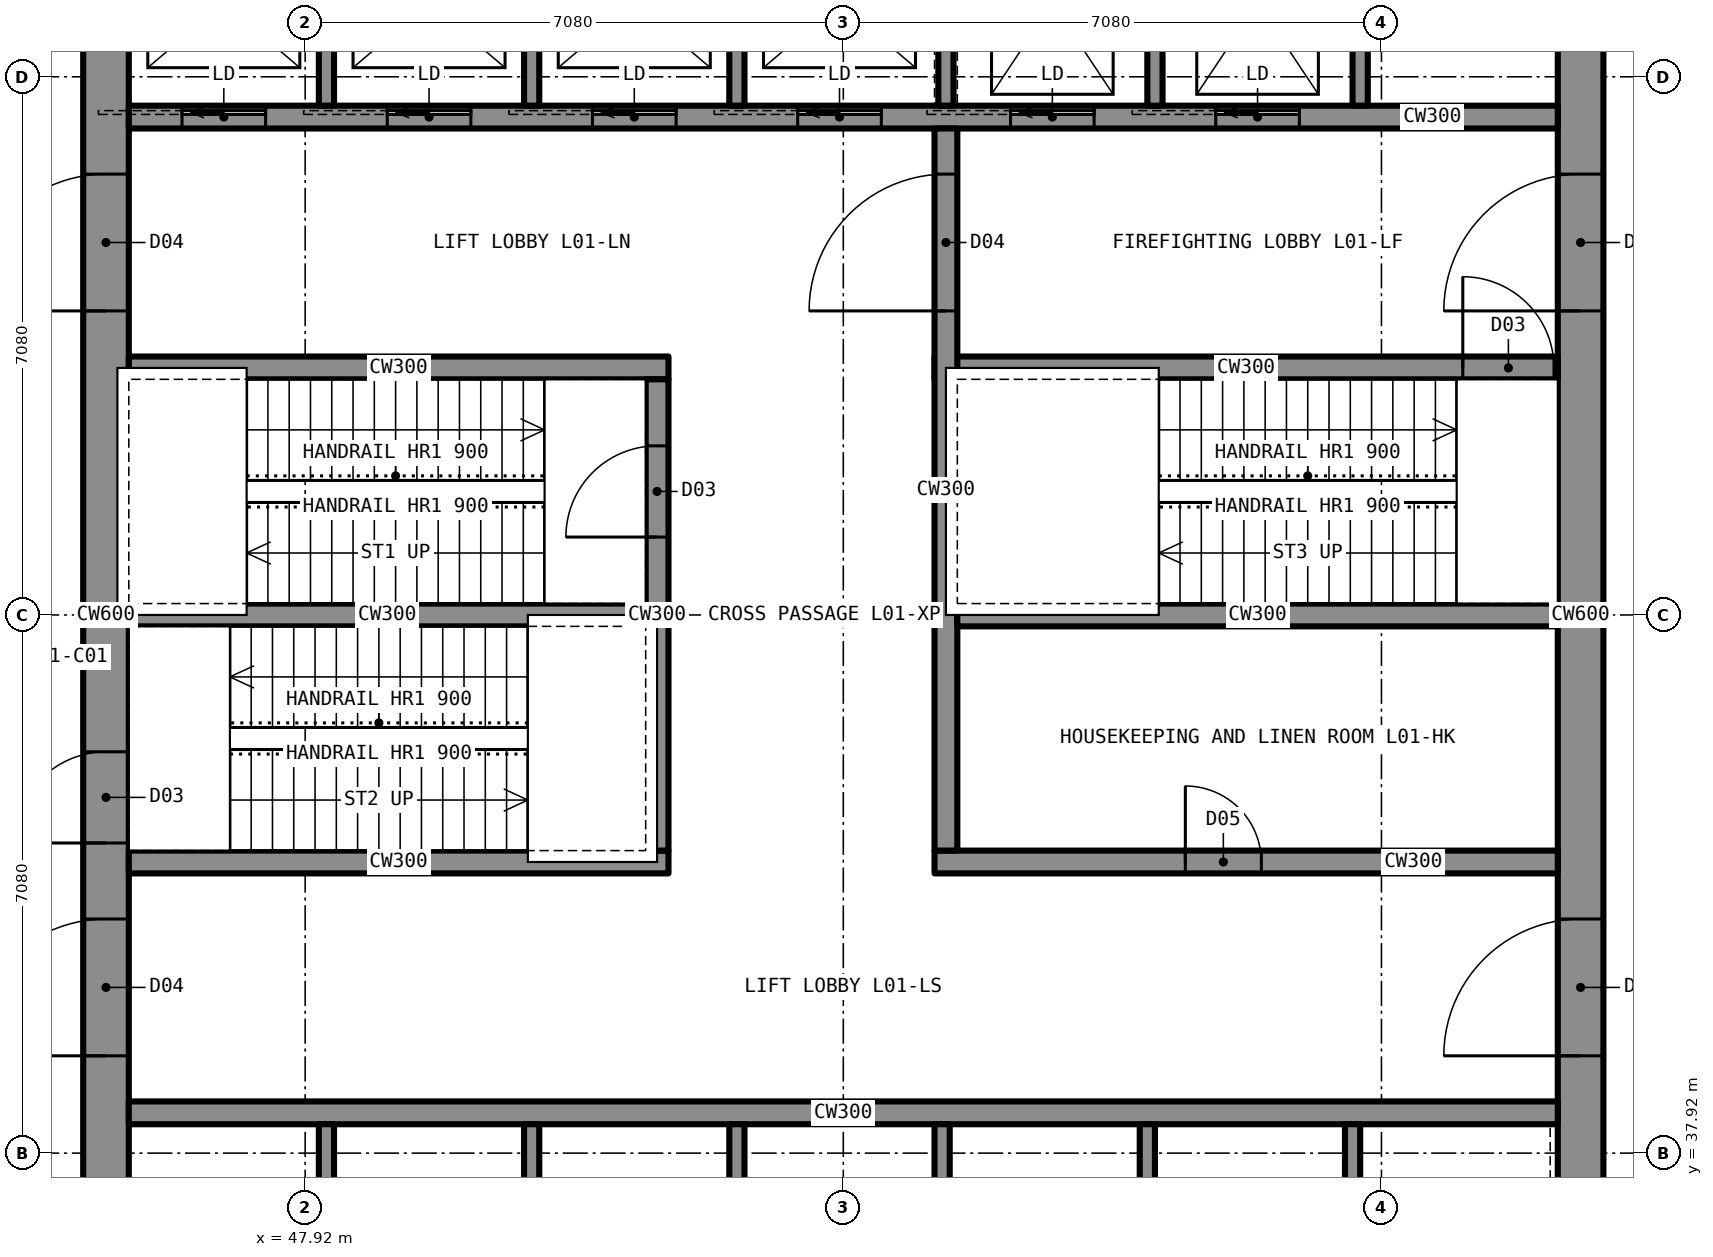
"""IFC4 building model, lengths in metres.
Left out: names, types, materials, properties, quantities, classifications, styles, units other than length and angle.
Written with IfcOpenShell. Run it as: python <this file> out.ifc"""

import sys

from ifc_helpers import new_model, si_unit, direction, frame, frame_2d, origin, place, context, subcontext, project, spatial, rectangle, extrude, element, fill, save


model = new_model("IFC4")
c1 = context("Model", 3, precision=1e-05, world=origin(), true_north=direction((0.0, 1.0)))
c2 = subcontext(c1, "Body", "Model", "MODEL_VIEW")
j1 = project(units=[si_unit("LENGTHUNIT", "METRE"), si_unit("PLANEANGLEUNIT", "RADIAN")], contexts=[c1])
p1 = place(None, origin())
s1 = spatial("IfcSite", under=j1, at=p1, CompositionType="ELEMENT")
p2 = place(p1, origin())
s2 = spatial("IfcBuilding", under=s1, at=p2, CompositionType="ELEMENT")
p3 = place(p2, frame((0.0, 0.0, 5.6)))
s3 = spatial("IfcBuildingStorey", under=s2, at=p3, CompositionType="ELEMENT", Elevation=5.6)
p4 = place(p3, frame((64.7, 35.6, 0.0), z_axis=(0.0, 0.0, 1.0), x_axis=(0.0, 1.0, 0.0)))
e1 = element("IfcWall", 1, at=p4, inside=s3, PredefinedType="SHEAR", context=c2, shape_type="SweptSolid", body=[
    extrude(rectangle(XDim=18.8, YDim=0.6, at=frame_2d((9.4, 0.0))), origin(), (0.0, 0.0, 1.0), 5.4),
])
p5 = place(p4, frame((13.4, 0.0, 0.0)))
e2 = element("IfcOpeningElement", 2, at=p5, cuts=e1, PredefinedType="OPENING", context=c2, shape_type="SweptSolid", body=[
    extrude(rectangle(XDim=1.8, YDim=2.2, at=frame_2d((0.9, 1.1))), frame((0.0, 0.31, 0.0), z_axis=(0.0, -1.0, 0.0), x_axis=(1.0, 0.0, 0.0)), (0.0, 0.0, 1.0), 0.62),
])
p6 = place(p4, frame((3.6, 0.0, 0.0)))
e3 = element("IfcOpeningElement", 3, at=p6, cuts=e1, PredefinedType="OPENING", context=c2, shape_type="SweptSolid", body=[
    extrude(rectangle(XDim=1.8, YDim=2.2, at=frame_2d((0.9, 1.1))), frame((0.0, 0.31, 0.0), z_axis=(0.0, -1.0, 0.0), x_axis=(1.0, 0.0, 0.0)), (0.0, 0.0, 1.0), 0.62),
])
p7 = place(p3, frame((45.3, 35.6, 0.0), z_axis=(0.0, 0.0, 1.0), x_axis=(0.0, 1.0, 0.0)))
e4 = element("IfcWall", 4, at=p7, inside=s3, PredefinedType="SHEAR", context=c2, shape_type="SweptSolid", body=[
    extrude(rectangle(XDim=18.8, YDim=0.6, at=frame_2d((9.4, 0.0))), origin(), (0.0, 0.0, 1.0), 5.4),
])
p8 = place(p7, frame((13.4, 0.0, 0.0)))
e5 = element("IfcOpeningElement", 5, at=p8, cuts=e4, PredefinedType="OPENING", context=c2, shape_type="SweptSolid", body=[
    extrude(rectangle(XDim=1.8, YDim=2.2, at=frame_2d((0.9, 1.1))), frame((0.0, 0.31, 0.0), z_axis=(0.0, -1.0, 0.0), x_axis=(1.0, 0.0, 0.0)), (0.0, 0.0, 1.0), 0.62),
])
p9 = place(p7, frame((3.6, 0.0, 0.0)))
e6 = element("IfcOpeningElement", 6, at=p9, cuts=e4, PredefinedType="OPENING", context=c2, shape_type="SweptSolid", body=[
    extrude(rectangle(XDim=1.8, YDim=2.2, at=frame_2d((0.9, 1.1))), frame((0.0, 0.31, 0.0), z_axis=(0.0, -1.0, 0.0), x_axis=(1.0, 0.0, 0.0)), (0.0, 0.0, 1.0), 0.62),
])
p10 = place(p7, frame((6.4, 0.0, 0.0)))
e7 = element("IfcOpeningElement", 7, at=p10, cuts=e4, PredefinedType="OPENING", context=c2, shape_type="SweptSolid", body=[
    extrude(rectangle(XDim=1.2, YDim=2.2, at=frame_2d((0.6, 1.1))), frame((0.0, 0.31, 0.0), z_axis=(0.0, -1.0, 0.0), x_axis=(1.0, 0.0, 0.0)), (0.0, 0.0, 1.0), 0.62),
])
p11 = place(p3, frame((45.6, 51.55, 0.0), z_axis=(0.0, 0.0, 1.0), x_axis=(1.0, 0.0, 0.0)))
e8 = element("IfcWall", 8, at=p11, inside=s3, PredefinedType="SHEAR", context=c2, shape_type="SweptSolid", body=[
    extrude(rectangle(XDim=18.8, YDim=0.3, at=frame_2d((9.4, 0.0))), origin(), (0.0, 0.0, 1.0), 5.4),
])
p12 = place(p11, frame((0.7, 0.0, 0.0)))
e9 = element("IfcOpeningElement", 9, at=p12, cuts=e8, PredefinedType="OPENING", context=c2, shape_type="SweptSolid", body=[
    extrude(rectangle(XDim=1.1, YDim=2.2, at=frame_2d((0.55, 1.1))), frame((0.0, 0.16, 0.0), z_axis=(0.0, -1.0, 0.0), x_axis=(1.0, 0.0, 0.0)), (0.0, 0.0, 1.0), 0.32),
])
p13 = place(p11, frame((3.4, 0.0, 0.0)))
e10 = element("IfcOpeningElement", 10, at=p13, cuts=e8, PredefinedType="OPENING", context=c2, shape_type="SweptSolid", body=[
    extrude(rectangle(XDim=1.1, YDim=2.2, at=frame_2d((0.55, 1.1))), frame((0.0, 0.16, 0.0), z_axis=(0.0, -1.0, 0.0), x_axis=(1.0, 0.0, 0.0)), (0.0, 0.0, 1.0), 0.32),
])
p14 = place(p11, frame((6.1, 0.0, 0.0)))
e11 = element("IfcOpeningElement", 11, at=p14, cuts=e8, PredefinedType="OPENING", context=c2, shape_type="SweptSolid", body=[
    extrude(rectangle(XDim=1.1, YDim=2.2, at=frame_2d((0.55, 1.1))), frame((0.0, 0.16, 0.0), z_axis=(0.0, -1.0, 0.0), x_axis=(1.0, 0.0, 0.0)), (0.0, 0.0, 1.0), 0.32),
])
p15 = place(p11, frame((8.8, 0.0, 0.0)))
e12 = element("IfcOpeningElement", 12, at=p15, cuts=e8, PredefinedType="OPENING", context=c2, shape_type="SweptSolid", body=[
    extrude(rectangle(XDim=1.1, YDim=2.2, at=frame_2d((0.55, 1.1))), frame((0.0, 0.16, 0.0), z_axis=(0.0, -1.0, 0.0), x_axis=(1.0, 0.0, 0.0)), (0.0, 0.0, 1.0), 0.32),
])
p16 = place(p11, frame((11.6, 0.0, 0.0)))
e13 = element("IfcOpeningElement", 13, at=p16, cuts=e8, PredefinedType="OPENING", context=c2, shape_type="SweptSolid", body=[
    extrude(rectangle(XDim=1.1, YDim=2.2, at=frame_2d((0.55, 1.1))), frame((0.0, 0.16, 0.0), z_axis=(0.0, -1.0, 0.0), x_axis=(1.0, 0.0, 0.0)), (0.0, 0.0, 1.0), 0.32),
])
p17 = place(p11, frame((14.3, 0.0, 0.0)))
e14 = element("IfcOpeningElement", 14, at=p17, cuts=e8, PredefinedType="OPENING", context=c2, shape_type="SweptSolid", body=[
    extrude(rectangle(XDim=1.1, YDim=2.2, at=frame_2d((0.55, 1.1))), frame((0.0, 0.16, 0.0), z_axis=(0.0, -1.0, 0.0), x_axis=(1.0, 0.0, 0.0)), (0.0, 0.0, 1.0), 0.32),
])
p18 = place(p3, frame((45.6, 38.45, 0.0), z_axis=(0.0, 0.0, 1.0), x_axis=(1.0, 0.0, 0.0)))
e15 = element("IfcWall", 15, at=p18, inside=s3, PredefinedType="SHEAR", context=c2, shape_type="SweptSolid", body=[
    extrude(rectangle(XDim=18.8, YDim=0.3, at=frame_2d((9.4, 0.0))), origin(), (0.0, 0.0, 1.0), 5.4),
])
p19 = place(p3, frame((45.6, 48.25, 0.0), z_axis=(0.0, 0.0, 1.0), x_axis=(1.0, 0.0, 0.0)))
e16 = element("IfcWall", 16, at=p19, inside=s3, PredefinedType="SHEAR", context=c2, shape_type="SweptSolid", body=[
    extrude(rectangle(XDim=7.1, YDim=0.3, at=frame_2d((3.55, 0.0))), origin(), (0.0, 0.0, 1.0), 5.4),
])
p20 = place(p3, frame((56.2, 48.25, 0.0), z_axis=(0.0, 0.0, 1.0), x_axis=(1.0, 0.0, 0.0)))
e17 = element("IfcWall", 17, at=p20, inside=s3, PredefinedType="SHEAR", context=c2, shape_type="SweptSolid", body=[
    extrude(rectangle(XDim=8.2, YDim=0.3, at=frame_2d((4.1, 0.0))), origin(), (0.0, 0.0, 1.0), 5.4),
])
p21 = place(p20, frame((6.95, 0.0, 0.0)))
e18 = element("IfcOpeningElement", 18, at=p21, cuts=e17, PredefinedType="OPENING", context=c2, shape_type="SweptSolid", body=[
    extrude(rectangle(XDim=1.2, YDim=2.2, at=frame_2d((0.6, 1.1))), frame((0.0, 0.16, 0.0), z_axis=(0.0, -1.0, 0.0), x_axis=(1.0, 0.0, 0.0)), (0.0, 0.0, 1.0), 0.32),
])
p22 = place(p3, frame((45.6, 41.75, 0.0), z_axis=(0.0, 0.0, 1.0), x_axis=(1.0, 0.0, 0.0)))
e19 = element("IfcWall", 19, at=p22, inside=s3, PredefinedType="SHEAR", context=c2, shape_type="SweptSolid", body=[
    extrude(rectangle(XDim=7.1, YDim=0.3, at=frame_2d((3.55, 0.0))), origin(), (0.0, 0.0, 1.0), 5.4),
])
p23 = place(p3, frame((56.2, 41.75, 0.0), z_axis=(0.0, 0.0, 1.0), x_axis=(1.0, 0.0, 0.0)))
e20 = element("IfcWall", 20, at=p23, inside=s3, PredefinedType="SHEAR", context=c2, shape_type="SweptSolid", body=[
    extrude(rectangle(XDim=8.2, YDim=0.3, at=frame_2d((4.1, 0.0))), origin(), (0.0, 0.0, 1.0), 5.4),
])
p24 = place(p23, frame((3.3, 0.0, 0.0)))
e21 = element("IfcOpeningElement", 21, at=p24, cuts=e20, PredefinedType="OPENING", context=c2, shape_type="SweptSolid", body=[
    extrude(rectangle(XDim=1.0, YDim=2.1, at=frame_2d((0.5, 1.05))), frame((0.0, 0.16, 0.0), z_axis=(0.0, -1.0, 0.0), x_axis=(1.0, 0.0, 0.0)), (0.0, 0.0, 1.0), 0.32),
])
p25 = place(p3, frame((52.55, 41.9, 0.0), z_axis=(0.0, 0.0, 1.0), x_axis=(0.0, 1.0, 0.0)))
e22 = element("IfcWall", 22, at=p25, inside=s3, PredefinedType="SHEAR", context=c2, shape_type="SweptSolid", body=[
    extrude(rectangle(XDim=6.2, YDim=0.3, at=frame_2d((3.1, 0.0))), origin(), (0.0, 0.0, 1.0), 5.4),
])
p26 = place(p25, frame((4.125, 0.0, 0.0)))
e23 = element("IfcOpeningElement", 23, at=p26, cuts=e22, PredefinedType="OPENING", context=c2, shape_type="SweptSolid", body=[
    extrude(rectangle(XDim=1.2, YDim=2.2, at=frame_2d((0.6, 1.1))), frame((0.0, 0.16, 0.0), z_axis=(0.0, -1.0, 0.0), x_axis=(1.0, 0.0, 0.0)), (0.0, 0.0, 1.0), 0.32),
])
p27 = place(p3, frame((56.35, 41.9, 0.0), z_axis=(0.0, 0.0, 1.0), x_axis=(0.0, 1.0, 0.0)))
e24 = element("IfcWall", 24, at=p27, inside=s3, PredefinedType="SHEAR", context=c2, shape_type="SweptSolid", body=[
    extrude(rectangle(XDim=9.5, YDim=0.3, at=frame_2d((4.75, 0.0))), origin(), (0.0, 0.0, 1.0), 5.4),
])
p28 = place(p27, frame((7.1, 0.0, 0.0)))
e25 = element("IfcOpeningElement", 25, at=p28, cuts=e24, PredefinedType="OPENING", context=c2, shape_type="SweptSolid", body=[
    extrude(rectangle(XDim=1.8, YDim=2.2, at=frame_2d((0.9, 1.1))), frame((0.0, 0.16, 0.0), z_axis=(0.0, -1.0, 0.0), x_axis=(1.0, 0.0, 0.0)), (0.0, 0.0, 1.0), 0.32),
])
p29 = place(p3, frame((45.6, 45.0, 0.0), z_axis=(0.0, 0.0, 1.0), x_axis=(1.0, 0.0, 0.0)))
e26 = element("IfcWall", 26, at=p29, inside=s3, PredefinedType="SHEAR", context=c2, shape_type="SweptSolid", body=[
    extrude(rectangle(XDim=6.8, YDim=0.3, at=frame_2d((3.4, 0.0))), origin(), (0.0, 0.0, 1.0), 5.4),
])
p30 = place(p3, frame((56.5, 45.0, 0.0), z_axis=(0.0, 0.0, 1.0), x_axis=(1.0, 0.0, 0.0)))
e27 = element("IfcWall", 27, at=p30, inside=s3, PredefinedType="SHEAR", context=c2, shape_type="SweptSolid", body=[
    extrude(rectangle(XDim=7.9, YDim=0.3, at=frame_2d((3.95, 0.0))), origin(), (0.0, 0.0, 1.0), 5.4),
])
for number, where, z_axis, x_axis in (
    (28, (48.2, 51.7, 0.0), (0.0, 0.0, 1.0), (0.0, 1.0, 0.0)),
    (29, (50.9, 51.7, 0.0), (0.0, 0.0, 1.0), (0.0, 1.0, 0.0)),
    (30, (53.6, 51.7, 0.0), (0.0, 0.0, 1.0), (0.0, 1.0, 0.0)),
    (31, (59.1, 51.7, 0.0), (0.0, 0.0, 1.0), (0.0, 1.0, 0.0)),
    (32, (61.8, 51.7, 0.0), (0.0, 0.0, 1.0), (0.0, 1.0, 0.0)),
    (33, (56.35, 51.7, 0.0), (0.0, 0.0, 1.0), (0.0, 1.0, 0.0)),
    (34, (48.2, 35.6, 0.0), (0.0, 0.0, 1.0), (0.0, 1.0, 0.0)),
    (35, (50.9, 35.6, 0.0), (0.0, 0.0, 1.0), (0.0, 1.0, 0.0)),
    (36, (53.6, 35.6, 0.0), (0.0, 0.0, 1.0), (0.0, 1.0, 0.0)),
    (37, (56.3, 35.6, 0.0), (0.0, 0.0, 1.0), (0.0, 1.0, 0.0)),
    (38, (59.0, 35.6, 0.0), (0.0, 0.0, 1.0), (0.0, 1.0, 0.0)),
    (39, (61.7, 35.6, 0.0), (0.0, 0.0, 1.0), (0.0, 1.0, 0.0)),
):
    element("IfcWall", number, at=place(p3, frame(where, z_axis=z_axis, x_axis=x_axis)), inside=s3, PredefinedType="PARTITIONING", context=c2, shape_type="SweptSolid", body=[
        extrude(rectangle(XDim=2.7, YDim=0.2, at=frame_2d((1.35, 0.0))), origin(), (0.0, 0.0, 1.0), 5.05),
    ])
p31 = place(p8, origin())
e40 = element("IfcDoor", 40, at=p31, inside=s3, OperationType="DOUBLE_DOOR_SINGLE_SWING", PredefinedType="DOOR", context=c2, shape_type="SweptSolid", body=[
    extrude(rectangle(XDim=1.8, YDim=2.2, at=frame_2d((0.9, 1.1))), frame((0.0, 0.025, 0.0), z_axis=(0.0, -1.0, 0.0), x_axis=(1.0, 0.0, 0.0)), (0.0, 0.0, 1.0), 0.05),
])
fill(e5, e40)
p32 = place(p9, origin())
e41 = element("IfcDoor", 41, at=p32, inside=s3, OperationType="DOUBLE_DOOR_SINGLE_SWING", PredefinedType="DOOR", context=c2, shape_type="SweptSolid", body=[
    extrude(rectangle(XDim=1.8, YDim=2.2, at=frame_2d((0.9, 1.1))), frame((0.0, 0.025, 0.0), z_axis=(0.0, -1.0, 0.0), x_axis=(1.0, 0.0, 0.0)), (0.0, 0.0, 1.0), 0.05),
])
fill(e6, e41)
p33 = place(p5, origin())
e42 = element("IfcDoor", 42, at=p33, inside=s3, OperationType="DOUBLE_DOOR_SINGLE_SWING", PredefinedType="DOOR", context=c2, shape_type="SweptSolid", body=[
    extrude(rectangle(XDim=1.8, YDim=2.2, at=frame_2d((0.9, 1.1))), frame((0.0, 0.025, 0.0), z_axis=(0.0, -1.0, 0.0), x_axis=(1.0, 0.0, 0.0)), (0.0, 0.0, 1.0), 0.05),
])
fill(e2, e42)
p34 = place(p6, origin())
e43 = element("IfcDoor", 43, at=p34, inside=s3, OperationType="DOUBLE_DOOR_SINGLE_SWING", PredefinedType="DOOR", context=c2, shape_type="SweptSolid", body=[
    extrude(rectangle(XDim=1.8, YDim=2.2, at=frame_2d((0.9, 1.1))), frame((0.0, 0.025, 0.0), z_axis=(0.0, -1.0, 0.0), x_axis=(1.0, 0.0, 0.0)), (0.0, 0.0, 1.0), 0.05),
])
fill(e3, e43)
p35 = place(p28, origin())
e44 = element("IfcDoor", 44, at=p35, inside=s3, OperationType="DOUBLE_DOOR_SINGLE_SWING", PredefinedType="DOOR", context=c2, shape_type="SweptSolid", body=[
    extrude(rectangle(XDim=1.8, YDim=2.2, at=frame_2d((0.9, 1.1))), frame((0.0, 0.025, 0.0), z_axis=(0.0, -1.0, 0.0), x_axis=(1.0, 0.0, 0.0)), (0.0, 0.0, 1.0), 0.05),
])
fill(e25, e44)
p36 = place(p26, origin())
e45 = element("IfcDoor", 45, at=p36, inside=s3, OperationType="SINGLE_SWING_LEFT", PredefinedType="DOOR", context=c2, shape_type="SweptSolid", body=[
    extrude(rectangle(XDim=1.2, YDim=2.2, at=frame_2d((0.6, 1.1))), frame((0.0, 0.025, 0.0), z_axis=(0.0, -1.0, 0.0), x_axis=(1.0, 0.0, 0.0)), (0.0, 0.0, 1.0), 0.05),
])
fill(e23, e45)
p37 = place(p10, origin())
e46 = element("IfcDoor", 46, at=p37, inside=s3, OperationType="SINGLE_SWING_LEFT", PredefinedType="DOOR", context=c2, shape_type="SweptSolid", body=[
    extrude(rectangle(XDim=1.2, YDim=2.2, at=frame_2d((0.6, 1.1))), frame((0.0, 0.025, 0.0), z_axis=(0.0, -1.0, 0.0), x_axis=(1.0, 0.0, 0.0)), (0.0, 0.0, 1.0), 0.05),
])
fill(e7, e46)
p38 = place(p21, origin())
e47 = element("IfcDoor", 47, at=p38, inside=s3, OperationType="SINGLE_SWING_LEFT", PredefinedType="DOOR", context=c2, shape_type="SweptSolid", body=[
    extrude(rectangle(XDim=1.2, YDim=2.2, at=frame_2d((0.6, 1.1))), frame((0.0, 0.025, 0.0), z_axis=(0.0, -1.0, 0.0), x_axis=(1.0, 0.0, 0.0)), (0.0, 0.0, 1.0), 0.05),
])
fill(e18, e47)
p39 = place(p24, origin())
e48 = element("IfcDoor", 48, at=p39, inside=s3, OperationType="SINGLE_SWING_LEFT", PredefinedType="DOOR", context=c2, shape_type="SweptSolid", body=[
    extrude(rectangle(XDim=1.0, YDim=2.1, at=frame_2d((0.5, 1.05))), frame((0.0, 0.025, 0.0), z_axis=(0.0, -1.0, 0.0), x_axis=(1.0, 0.0, 0.0)), (0.0, 0.0, 1.0), 0.05),
])
fill(e21, e48)
p40 = place(p12, origin())
e49 = element("IfcDoor", 49, at=p40, inside=s3, OperationType="SLIDING_TO_LEFT", PredefinedType="DOOR", context=c2, shape_type="SweptSolid", body=[
    extrude(rectangle(XDim=1.1, YDim=2.2, at=frame_2d((0.55, 1.1))), frame((0.0, 0.025, 0.0), z_axis=(0.0, -1.0, 0.0), x_axis=(1.0, 0.0, 0.0)), (0.0, 0.0, 1.0), 0.05),
])
fill(e9, e49)
p41 = place(p13, origin())
e50 = element("IfcDoor", 50, at=p41, inside=s3, OperationType="SLIDING_TO_LEFT", PredefinedType="DOOR", context=c2, shape_type="SweptSolid", body=[
    extrude(rectangle(XDim=1.1, YDim=2.2, at=frame_2d((0.55, 1.1))), frame((0.0, 0.025, 0.0), z_axis=(0.0, -1.0, 0.0), x_axis=(1.0, 0.0, 0.0)), (0.0, 0.0, 1.0), 0.05),
])
fill(e10, e50)
p42 = place(p14, origin())
e51 = element("IfcDoor", 51, at=p42, inside=s3, OperationType="SLIDING_TO_LEFT", PredefinedType="DOOR", context=c2, shape_type="SweptSolid", body=[
    extrude(rectangle(XDim=1.1, YDim=2.2, at=frame_2d((0.55, 1.1))), frame((0.0, 0.025, 0.0), z_axis=(0.0, -1.0, 0.0), x_axis=(1.0, 0.0, 0.0)), (0.0, 0.0, 1.0), 0.05),
])
fill(e11, e51)
p43 = place(p15, origin())
e52 = element("IfcDoor", 52, at=p43, inside=s3, OperationType="SLIDING_TO_LEFT", PredefinedType="DOOR", context=c2, shape_type="SweptSolid", body=[
    extrude(rectangle(XDim=1.1, YDim=2.2, at=frame_2d((0.55, 1.1))), frame((0.0, 0.025, 0.0), z_axis=(0.0, -1.0, 0.0), x_axis=(1.0, 0.0, 0.0)), (0.0, 0.0, 1.0), 0.05),
])
fill(e12, e52)
p44 = place(p16, origin())
e53 = element("IfcDoor", 53, at=p44, inside=s3, OperationType="SLIDING_TO_LEFT", PredefinedType="DOOR", context=c2, shape_type="SweptSolid", body=[
    extrude(rectangle(XDim=1.1, YDim=2.2, at=frame_2d((0.55, 1.1))), frame((0.0, 0.025, 0.0), z_axis=(0.0, -1.0, 0.0), x_axis=(1.0, 0.0, 0.0)), (0.0, 0.0, 1.0), 0.05),
])
fill(e13, e53)
p45 = place(p17, origin())
e54 = element("IfcDoor", 54, at=p45, inside=s3, OperationType="SLIDING_TO_LEFT", PredefinedType="DOOR", context=c2, shape_type="SweptSolid", body=[
    extrude(rectangle(XDim=1.1, YDim=2.2, at=frame_2d((0.55, 1.1))), frame((0.0, 0.025, 0.0), z_axis=(0.0, -1.0, 0.0), x_axis=(1.0, 0.0, 0.0)), (0.0, 0.0, 1.0), 0.05),
])
fill(e14, e54)
save(model, sys.argv[1])
